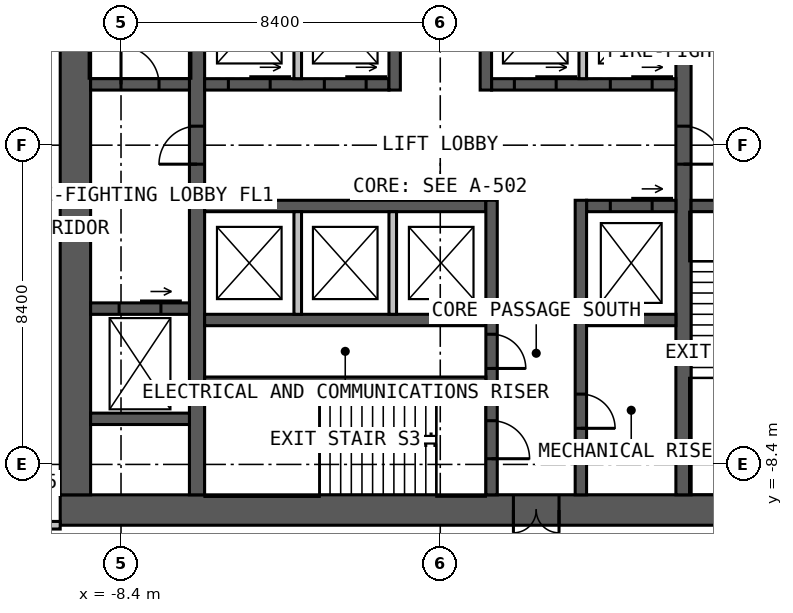
"""IFC4 building model, lengths in metres.
Left out: names, types, materials, properties, quantities, classifications, styles, units other than length and angle.
Written with IfcOpenShell. Run it as: python <this file> out.ifc"""

import sys

from ifc_helpers import new_model, si_unit, direction, frame, frame_2d, origin, place, context, subcontext, project, spatial, rectangle, extrude, element, fill, save


model = new_model("IFC4")
c1 = context("Model", 3, precision=1e-05, world=origin(), true_north=direction((0.0, 1.0)))
c2 = subcontext(c1, "Body", "Model", "MODEL_VIEW")
j1 = project(units=[si_unit("LENGTHUNIT", "METRE"), si_unit("PLANEANGLEUNIT", "RADIAN")], contexts=[c1])
p1 = place(None, origin())
s1 = spatial("IfcSite", under=j1, at=p1, CompositionType="ELEMENT")
p2 = place(p1, origin())
s2 = spatial("IfcBuilding", under=s1, at=p2, CompositionType="ELEMENT")
p3 = place(p2, frame((0.0, 0.0, 69.0)))
s3 = spatial("IfcBuildingStorey", under=s2, at=p3, CompositionType="ELEMENT", Elevation=69.0)
p4 = place(p3, frame((10.0, -9.6, 0.0), z_axis=(0.0, 0.0, 1.0), x_axis=(-1.0, 0.0, 0.0)))
e1 = element("IfcWall", 1, at=p4, inside=s3, PredefinedType="SOLIDWALL", context=c2, shape_type="SweptSolid", body=[
    extrude(rectangle(XDim=20.0, YDim=0.8, at=frame_2d((10.0, 0.0))), origin(), (0.0, 0.0, 1.0), 4.0),
])
p5 = place(p4, frame((6.875, 0.0, 0.0)))
e2 = element("IfcOpeningElement", 2, at=p5, cuts=e1, PredefinedType="OPENING", context=c2, shape_type="SweptSolid", body=[
    extrude(rectangle(XDim=1.2, YDim=2.2, at=frame_2d((0.6, 1.1))), frame((0.0, 0.41, 0.0), z_axis=(0.0, -1.0, 0.0), x_axis=(1.0, 0.0, 0.0)), (0.0, 0.0, 1.0), 0.82),
])
p6 = place(p3, frame((-9.6, 9.2, 0.0), z_axis=(0.0, 0.0, 1.0), x_axis=(0.0, -1.0, 0.0)))
e3 = element("IfcWall", 3, at=p6, inside=s3, PredefinedType="SOLIDWALL", context=c2, shape_type="SweptSolid", body=[
    extrude(rectangle(XDim=18.4, YDim=0.8, at=frame_2d((9.2, 0.0))), origin(), (0.0, 0.0, 1.0), 4.0),
])
p7 = place(p3, frame((-6.4, -9.2, 0.0), z_axis=(0.0, 0.0, 1.0), x_axis=(0.0, 1.0, 0.0)))
e4 = element("IfcWall", 4, at=p7, inside=s3, PredefinedType="SOLIDWALL", context=c2, shape_type="SweptSolid", body=[
    extrude(rectangle(XDim=18.4, YDim=0.4, at=frame_2d((9.2, 0.0))), origin(), (0.0, 0.0, 1.0), 4.0),
])
p8 = place(p7, frame((8.7, 0.0, 0.0)))
e5 = element("IfcOpeningElement", 5, at=p8, cuts=e4, PredefinedType="OPENING", context=c2, shape_type="SweptSolid", body=[
    extrude(rectangle(XDim=1.0, YDim=2.2, at=frame_2d((0.5, 1.1))), frame((0.0, 0.21, 0.0), z_axis=(0.0, -1.0, 0.0), x_axis=(1.0, 0.0, 0.0)), (0.0, 0.0, 1.0), 0.42),
])
p9 = place(p3, frame((6.4, 9.2, 0.0), z_axis=(0.0, 0.0, 1.0), x_axis=(0.0, -1.0, 0.0)))
e6 = element("IfcWall", 6, at=p9, inside=s3, PredefinedType="SOLIDWALL", context=c2, shape_type="SweptSolid", body=[
    extrude(rectangle(XDim=18.4, YDim=0.4, at=frame_2d((9.2, 0.0))), origin(), (0.0, 0.0, 1.0), 4.0),
])
p10 = place(p9, frame((8.7, 0.0, 0.0)))
e7 = element("IfcOpeningElement", 7, at=p10, cuts=e6, PredefinedType="OPENING", context=c2, shape_type="SweptSolid", body=[
    extrude(rectangle(XDim=1.0, YDim=2.2, at=frame_2d((0.5, 1.1))), frame((0.0, 0.21, 0.0), z_axis=(0.0, -1.0, 0.0), x_axis=(1.0, 0.0, 0.0)), (0.0, 0.0, 1.0), 0.42),
])
p11 = place(p3, frame((-6.2, 1.6, 0.0), z_axis=(0.0, 0.0, 1.0), x_axis=(1.0, 0.0, 0.0)))
e8 = element("IfcWall", 8, at=p11, inside=s3, PredefinedType="SOLIDWALL", context=c2, shape_type="SweptSolid", body=[
    extrude(rectangle(XDim=4.85, YDim=0.3, at=frame_2d((2.425, 0.0))), origin(), (0.0, 0.0, 1.0), 4.0),
])
p12 = place(p11, frame((0.625, 0.0, 0.0)))
e9 = element("IfcOpeningElement", 9, at=p12, cuts=e8, PredefinedType="OPENING", context=c2, shape_type="SweptSolid", body=[
    extrude(rectangle(XDim=1.1, YDim=2.2, at=frame_2d((0.55, 1.1))), frame((0.0, 0.16, 0.0), z_axis=(0.0, -1.0, 0.0), x_axis=(1.0, 0.0, 0.0)), (0.0, 0.0, 1.0), 0.32),
])
p13 = place(p11, frame((3.15, 0.0, 0.0)))
e10 = element("IfcOpeningElement", 10, at=p13, cuts=e8, PredefinedType="OPENING", context=c2, shape_type="SweptSolid", body=[
    extrude(rectangle(XDim=1.1, YDim=2.2, at=frame_2d((0.55, 1.1))), frame((0.0, 0.16, 0.0), z_axis=(0.0, -1.0, 0.0), x_axis=(1.0, 0.0, 0.0)), (0.0, 0.0, 1.0), 0.32),
])
p14 = place(p3, frame((1.35, 1.6, 0.0), z_axis=(0.0, 0.0, 1.0), x_axis=(1.0, 0.0, 0.0)))
e11 = element("IfcWall", 11, at=p14, inside=s3, PredefinedType="SOLIDWALL", context=c2, shape_type="SweptSolid", body=[
    extrude(rectangle(XDim=4.85, YDim=0.3, at=frame_2d((2.425, 0.0))), origin(), (0.0, 0.0, 1.0), 4.0),
])
p15 = place(p14, frame((0.6, 0.0, 0.0)))
e12 = element("IfcOpeningElement", 12, at=p15, cuts=e11, PredefinedType="OPENING", context=c2, shape_type="SweptSolid", body=[
    extrude(rectangle(XDim=1.1, YDim=2.2, at=frame_2d((0.55, 1.1))), frame((0.0, 0.16, 0.0), z_axis=(0.0, -1.0, 0.0), x_axis=(1.0, 0.0, 0.0)), (0.0, 0.0, 1.0), 0.32),
])
p16 = place(p14, frame((3.125, 0.0, 0.0)))
e13 = element("IfcOpeningElement", 13, at=p16, cuts=e11, PredefinedType="OPENING", context=c2, shape_type="SweptSolid", body=[
    extrude(rectangle(XDim=1.1, YDim=2.2, at=frame_2d((0.55, 1.1))), frame((0.0, 0.16, 0.0), z_axis=(0.0, -1.0, 0.0), x_axis=(1.0, 0.0, 0.0)), (0.0, 0.0, 1.0), 0.32),
])
p17 = place(p3, frame((-1.2, 1.45, 0.0), z_axis=(0.0, 0.0, 1.0), x_axis=(0.0, 1.0, 0.0)))
e14 = element("IfcWall", 14, at=p17, inside=s3, PredefinedType="SOLIDWALL", context=c2, shape_type="SweptSolid", body=[
    extrude(rectangle(XDim=7.75, YDim=0.3, at=frame_2d((3.875, 0.0))), origin(), (0.0, 0.0, 1.0), 4.0),
])
p18 = place(p17, frame((5.05, 0.0, 0.0)))
e15 = element("IfcOpeningElement", 15, at=p18, cuts=e14, PredefinedType="OPENING", context=c2, shape_type="SweptSolid", body=[
    extrude(rectangle(XDim=1.0, YDim=2.2, at=frame_2d((0.5, 1.1))), frame((0.0, 0.16, 0.0), z_axis=(0.0, -1.0, 0.0), x_axis=(1.0, 0.0, 0.0)), (0.0, 0.0, 1.0), 0.32),
])
p19 = place(p3, frame((1.2, 1.45, 0.0), z_axis=(0.0, 0.0, 1.0), x_axis=(0.0, 1.0, 0.0)))
e16 = element("IfcWall", 16, at=p19, inside=s3, PredefinedType="SOLIDWALL", context=c2, shape_type="SweptSolid", body=[
    extrude(rectangle(XDim=7.75, YDim=0.3, at=frame_2d((3.875, 0.0))), origin(), (0.0, 0.0, 1.0), 4.0),
])
p20 = place(p19, frame((3.8, 0.0, 0.0)))
e17 = element("IfcOpeningElement", 17, at=p20, cuts=e16, PredefinedType="OPENING", context=c2, shape_type="SweptSolid", body=[
    extrude(rectangle(XDim=1.0, YDim=2.2, at=frame_2d((0.5, 1.1))), frame((0.0, 0.16, 0.0), z_axis=(0.0, -1.0, 0.0), x_axis=(1.0, 0.0, 0.0)), (0.0, 0.0, 1.0), 0.32),
])
p21 = place(p19, frame((6.15, 0.0, 0.0)))
e18 = element("IfcOpeningElement", 18, at=p21, cuts=e16, PredefinedType="OPENING", context=c2, shape_type="SweptSolid", body=[
    extrude(rectangle(XDim=1.0, YDim=2.2, at=frame_2d((0.5, 1.1))), frame((0.0, 0.16, 0.0), z_axis=(0.0, -1.0, 0.0), x_axis=(1.0, 0.0, 0.0)), (0.0, 0.0, 1.0), 0.32),
])
p22 = place(p3, frame((-6.2, -1.6, 0.0), z_axis=(0.0, 0.0, 1.0), x_axis=(1.0, 0.0, 0.0)))
e19 = element("IfcWall", 19, at=p22, inside=s3, PredefinedType="SOLIDWALL", context=c2, shape_type="SweptSolid", body=[
    extrude(rectangle(XDim=7.4, YDim=0.3, at=frame_2d((3.7, 0.0))), origin(), (0.0, 0.0, 1.0), 4.0),
])
p23 = place(p3, frame((3.85, -1.6, 0.0), z_axis=(0.0, 0.0, 1.0), x_axis=(1.0, 0.0, 0.0)))
e20 = element("IfcWall", 20, at=p23, inside=s3, PredefinedType="SOLIDWALL", context=c2, shape_type="SweptSolid", body=[
    extrude(rectangle(XDim=2.35, YDim=0.3, at=frame_2d((1.175, 0.0))), origin(), (0.0, 0.0, 1.0), 4.0),
])
p24 = place(p23, frame((0.625, 0.0, 0.0)))
e21 = element("IfcOpeningElement", 21, at=p24, cuts=e20, PredefinedType="OPENING", context=c2, shape_type="SweptSolid", body=[
    extrude(rectangle(XDim=1.1, YDim=2.2, at=frame_2d((0.55, 1.1))), frame((0.0, 0.16, 0.0), z_axis=(0.0, -1.0, 0.0), x_axis=(1.0, 0.0, 0.0)), (0.0, 0.0, 1.0), 0.32),
])
p25 = place(p3, frame((-6.2, -4.6, 0.0), z_axis=(0.0, 0.0, 1.0), x_axis=(1.0, 0.0, 0.0)))
e22 = element("IfcWall", 22, at=p25, inside=s3, PredefinedType="SOLIDWALL", context=c2, shape_type="SweptSolid", body=[
    extrude(rectangle(XDim=7.4, YDim=0.3, at=frame_2d((3.7, 0.0))), origin(), (0.0, 0.0, 1.0), 4.0),
])
p26 = place(p3, frame((3.85, -4.6, 0.0), z_axis=(0.0, 0.0, 1.0), x_axis=(1.0, 0.0, 0.0)))
e23 = element("IfcWall", 23, at=p26, inside=s3, PredefinedType="SOLIDWALL", context=c2, shape_type="SweptSolid", body=[
    extrude(rectangle(XDim=2.35, YDim=0.3, at=frame_2d((1.175, 0.0))), origin(), (0.0, 0.0, 1.0), 4.0),
])
p27 = place(p3, frame((1.35, -1.45, 0.0), z_axis=(0.0, 0.0, 1.0), x_axis=(0.0, -1.0, 0.0)))
e24 = element("IfcWall", 24, at=p27, inside=s3, PredefinedType="SOLIDWALL", context=c2, shape_type="SweptSolid", body=[
    extrude(rectangle(XDim=7.75, YDim=0.3, at=frame_2d((3.875, 0.0))), origin(), (0.0, 0.0, 1.0), 4.0),
])
p28 = place(p27, frame((5.8, 0.0, 0.0)))
e25 = element("IfcOpeningElement", 25, at=p28, cuts=e24, PredefinedType="OPENING", context=c2, shape_type="SweptSolid", body=[
    extrude(rectangle(XDim=1.0, YDim=2.2, at=frame_2d((0.5, 1.1))), frame((0.0, 0.16, 0.0), z_axis=(0.0, -1.0, 0.0), x_axis=(1.0, 0.0, 0.0)), (0.0, 0.0, 1.0), 0.32),
])
p29 = place(p27, frame((3.525, 0.0, 0.0)))
e26 = element("IfcOpeningElement", 26, at=p29, cuts=e24, PredefinedType="OPENING", context=c2, shape_type="SweptSolid", body=[
    extrude(rectangle(XDim=0.9, YDim=2.2, at=frame_2d((0.45, 1.1))), frame((0.0, 0.16, 0.0), z_axis=(0.0, -1.0, 0.0), x_axis=(1.0, 0.0, 0.0)), (0.0, 0.0, 1.0), 0.32),
])
p30 = place(p3, frame((3.7, -1.45, 0.0), z_axis=(0.0, 0.0, 1.0), x_axis=(0.0, -1.0, 0.0)))
e27 = element("IfcWall", 27, at=p30, inside=s3, PredefinedType="SOLIDWALL", context=c2, shape_type="SweptSolid", body=[
    extrude(rectangle(XDim=7.75, YDim=0.3, at=frame_2d((3.875, 0.0))), origin(), (0.0, 0.0, 1.0), 4.0),
])
p31 = place(p30, frame((5.1, 0.0, 0.0)))
e28 = element("IfcOpeningElement", 28, at=p31, cuts=e27, PredefinedType="OPENING", context=c2, shape_type="SweptSolid", body=[
    extrude(rectangle(XDim=0.9, YDim=2.2, at=frame_2d((0.45, 1.1))), frame((0.0, 0.16, 0.0), z_axis=(0.0, -1.0, 0.0), x_axis=(1.0, 0.0, 0.0)), (0.0, 0.0, 1.0), 0.32),
])
p32 = place(p3, frame((-6.2, -6.2, 0.0), z_axis=(0.0, 0.0, 1.0), x_axis=(1.0, 0.0, 0.0)))
e29 = element("IfcWall", 29, at=p32, inside=s3, PredefinedType="SOLIDWALL", context=c2, shape_type="SweptSolid", body=[
    extrude(rectangle(XDim=7.4, YDim=0.2, at=frame_2d((3.7, 0.0))), origin(), (0.0, 0.0, 1.0), 4.0),
])
p33 = place(p3, frame((-9.2, 1.6, 0.0), z_axis=(0.0, 0.0, 1.0), x_axis=(1.0, 0.0, 0.0)))
e30 = element("IfcWall", 30, at=p33, inside=s3, PredefinedType="SOLIDWALL", context=c2, shape_type="SweptSolid", body=[
    extrude(rectangle(XDim=2.6, YDim=0.3, at=frame_2d((1.3, 0.0))), origin(), (0.0, 0.0, 1.0), 4.0),
])
p34 = place(p33, frame((0.8, 0.0, 0.0)))
e31 = element("IfcOpeningElement", 31, at=p34, cuts=e30, PredefinedType="OPENING", context=c2, shape_type="SweptSolid", body=[
    extrude(rectangle(XDim=1.0, YDim=2.2, at=frame_2d((0.5, 1.1))), frame((0.0, 0.16, 0.0), z_axis=(0.0, -1.0, 0.0), x_axis=(1.0, 0.0, 0.0)), (0.0, 0.0, 1.0), 0.32),
])
p35 = place(p3, frame((6.6, -1.6, 0.0), z_axis=(0.0, 0.0, 1.0), x_axis=(1.0, 0.0, 0.0)))
e32 = element("IfcWall", 32, at=p35, inside=s3, PredefinedType="SOLIDWALL", context=c2, shape_type="SweptSolid", body=[
    extrude(rectangle(XDim=2.6, YDim=0.3, at=frame_2d((1.3, 0.0))), origin(), (0.0, 0.0, 1.0), 4.0),
])
p36 = place(p35, frame((0.8, 0.0, 0.0)))
e33 = element("IfcOpeningElement", 33, at=p36, cuts=e32, PredefinedType="OPENING", context=c2, shape_type="SweptSolid", body=[
    extrude(rectangle(XDim=1.0, YDim=2.2, at=frame_2d((0.5, 1.1))), frame((0.0, 0.16, 0.0), z_axis=(0.0, -1.0, 0.0), x_axis=(1.0, 0.0, 0.0)), (0.0, 0.0, 1.0), 0.32),
])
p37 = place(p3, frame((-9.2, -4.3, 0.0), z_axis=(0.0, 0.0, 1.0), x_axis=(1.0, 0.0, 0.0)))
e34 = element("IfcWall", 34, at=p37, inside=s3, PredefinedType="SOLIDWALL", context=c2, shape_type="SweptSolid", body=[
    extrude(rectangle(XDim=2.6, YDim=0.3, at=frame_2d((1.3, 0.0))), origin(), (0.0, 0.0, 1.0), 4.0),
])
p38 = place(p37, frame((0.75, 0.0, 0.0)))
e35 = element("IfcOpeningElement", 35, at=p38, cuts=e34, PredefinedType="OPENING", context=c2, shape_type="SweptSolid", body=[
    extrude(rectangle(XDim=1.1, YDim=2.2, at=frame_2d((0.55, 1.1))), frame((0.0, 0.16, 0.0), z_axis=(0.0, -1.0, 0.0), x_axis=(1.0, 0.0, 0.0)), (0.0, 0.0, 1.0), 0.32),
])
p39 = place(p3, frame((-9.2, -7.2, 0.0), z_axis=(0.0, 0.0, 1.0), x_axis=(1.0, 0.0, 0.0)))
e36 = element("IfcWall", 36, at=p39, inside=s3, PredefinedType="SOLIDWALL", context=c2, shape_type="SweptSolid", body=[
    extrude(rectangle(XDim=2.6, YDim=0.3, at=frame_2d((1.3, 0.0))), origin(), (0.0, 0.0, 1.0), 4.0),
])
for number, where, z_axis, x_axis in (
    (37, (-3.75, 1.75, 0.0), (0.0, 0.0, 1.0), (0.0, 1.0, 0.0)),
    (38, (3.75, 1.75, 0.0), (0.0, 0.0, 1.0), (0.0, 1.0, 0.0)),
    (39, (-3.75, -1.75, 0.0), (0.0, 0.0, 1.0), (0.0, -1.0, 0.0)),
    (40, (-1.25, -1.75, 0.0), (0.0, 0.0, 1.0), (0.0, -1.0, 0.0)),
):
    element("IfcWall", number, at=place(p3, frame(where, z_axis=z_axis, x_axis=x_axis)), inside=s3, PredefinedType="SOLIDWALL", context=c2, shape_type="SweptSolid", body=[
        extrude(rectangle(XDim=2.7, YDim=0.2, at=frame_2d((1.35, 0.0))), origin(), (0.0, 0.0, 1.0), 3.75),
    ])
p40 = place(p3, frame((-10.0, -10.0, 0.0), z_axis=(0.0, 0.0, 1.0), x_axis=(-1.0, 0.0, 0.0)))
e41 = element("IfcWall", 41, at=p40, inside=s3, PredefinedType="PARTITIONING", context=c2, shape_type="SweptSolid", body=[
    extrude(rectangle(XDim=2.0, YDim=0.2, at=frame_2d((1.0, 0.0))), origin(), (0.0, 0.0, 1.0), 3.8),
])
p41 = place(p40, frame((0.5, 0.0, 0.0)))
e42 = element("IfcOpeningElement", 42, at=p41, cuts=e41, PredefinedType="OPENING", context=c2, shape_type="SweptSolid", body=[
    extrude(rectangle(XDim=1.0, YDim=2.2, at=frame_2d((0.5, 1.1))), frame((0.0, 0.11, 0.0), z_axis=(0.0, -1.0, 0.0), x_axis=(1.0, 0.0, 0.0)), (0.0, 0.0, 1.0), 0.22),
])
p42 = place(p5, origin())
e43 = element("IfcDoor", 43, at=p42, inside=s3, OperationType="DOUBLE_DOOR_SINGLE_SWING", PredefinedType="DOOR", context=c2, shape_type="SweptSolid", body=[
    extrude(rectangle(XDim=1.2, YDim=2.2, at=frame_2d((0.6, 1.1))), frame((0.0, 0.025, 0.0), z_axis=(0.0, -1.0, 0.0), x_axis=(1.0, 0.0, 0.0)), (0.0, 0.0, 1.0), 0.05),
])
fill(e2, e43)
p43 = place(p8, origin())
e44 = element("IfcDoor", 44, at=p43, inside=s3, OperationType="SINGLE_SWING_LEFT", PredefinedType="DOOR", context=c2, shape_type="SweptSolid", body=[
    extrude(rectangle(XDim=1.0, YDim=2.2, at=frame_2d((0.5, 1.1))), frame((0.0, 0.025, 0.0), z_axis=(0.0, -1.0, 0.0), x_axis=(1.0, 0.0, 0.0)), (0.0, 0.0, 1.0), 0.05),
])
fill(e5, e44)
p44 = place(p10, origin())
e45 = element("IfcDoor", 45, at=p44, inside=s3, OperationType="SINGLE_SWING_RIGHT", PredefinedType="DOOR", context=c2, shape_type="SweptSolid", body=[
    extrude(rectangle(XDim=1.0, YDim=2.2, at=frame_2d((0.5, 1.1))), frame((0.0, 0.025, 0.0), z_axis=(0.0, -1.0, 0.0), x_axis=(1.0, 0.0, 0.0)), (0.0, 0.0, 1.0), 0.05),
])
fill(e7, e45)
p45 = place(p34, origin())
e46 = element("IfcDoor", 46, at=p45, inside=s3, OperationType="SINGLE_SWING_LEFT", PredefinedType="DOOR", context=c2, shape_type="SweptSolid", body=[
    extrude(rectangle(XDim=1.0, YDim=2.2, at=frame_2d((0.5, 1.1))), frame((0.0, 0.025, 0.0), z_axis=(0.0, -1.0, 0.0), x_axis=(1.0, 0.0, 0.0)), (0.0, 0.0, 1.0), 0.05),
])
fill(e31, e46)
p46 = place(p28, origin())
e47 = element("IfcDoor", 47, at=p46, inside=s3, OperationType="SINGLE_SWING_RIGHT", PredefinedType="DOOR", context=c2, shape_type="SweptSolid", body=[
    extrude(rectangle(XDim=1.0, YDim=2.2, at=frame_2d((0.5, 1.1))), frame((0.0, 0.025, 0.0), z_axis=(0.0, -1.0, 0.0), x_axis=(1.0, 0.0, 0.0)), (0.0, 0.0, 1.0), 0.05),
])
fill(e25, e47)
p47 = place(p29, origin())
e48 = element("IfcDoor", 48, at=p47, inside=s3, OperationType="SINGLE_SWING_RIGHT", PredefinedType="DOOR", context=c2, shape_type="SweptSolid", body=[
    extrude(rectangle(XDim=0.9, YDim=2.2, at=frame_2d((0.45, 1.1))), frame((0.0, 0.025, 0.0), z_axis=(0.0, -1.0, 0.0), x_axis=(1.0, 0.0, 0.0)), (0.0, 0.0, 1.0), 0.05),
])
fill(e26, e48)
p48 = place(p31, origin())
e49 = element("IfcDoor", 49, at=p48, inside=s3, OperationType="SINGLE_SWING_RIGHT", PredefinedType="DOOR", context=c2, shape_type="SweptSolid", body=[
    extrude(rectangle(XDim=0.9, YDim=2.2, at=frame_2d((0.45, 1.1))), frame((0.0, 0.025, 0.0), z_axis=(0.0, -1.0, 0.0), x_axis=(1.0, 0.0, 0.0)), (0.0, 0.0, 1.0), 0.05),
])
fill(e28, e49)
p49 = place(p12, origin())
e50 = element("IfcDoor", 50, at=p49, inside=s3, OperationType="SLIDING_TO_LEFT", PredefinedType="DOOR", context=c2, shape_type="SweptSolid", body=[
    extrude(rectangle(XDim=1.1, YDim=2.2, at=frame_2d((0.55, 1.1))), frame((0.0, 0.025, 0.0), z_axis=(0.0, -1.0, 0.0), x_axis=(1.0, 0.0, 0.0)), (0.0, 0.0, 1.0), 0.05),
])
fill(e9, e50)
p50 = place(p13, origin())
e51 = element("IfcDoor", 51, at=p50, inside=s3, OperationType="SLIDING_TO_LEFT", PredefinedType="DOOR", context=c2, shape_type="SweptSolid", body=[
    extrude(rectangle(XDim=1.1, YDim=2.2, at=frame_2d((0.55, 1.1))), frame((0.0, 0.025, 0.0), z_axis=(0.0, -1.0, 0.0), x_axis=(1.0, 0.0, 0.0)), (0.0, 0.0, 1.0), 0.05),
])
fill(e10, e51)
p51 = place(p15, origin())
e52 = element("IfcDoor", 52, at=p51, inside=s3, OperationType="SLIDING_TO_LEFT", PredefinedType="DOOR", context=c2, shape_type="SweptSolid", body=[
    extrude(rectangle(XDim=1.1, YDim=2.2, at=frame_2d((0.55, 1.1))), frame((0.0, 0.025, 0.0), z_axis=(0.0, -1.0, 0.0), x_axis=(1.0, 0.0, 0.0)), (0.0, 0.0, 1.0), 0.05),
])
fill(e12, e52)
p52 = place(p16, origin())
e53 = element("IfcDoor", 53, at=p52, inside=s3, OperationType="SLIDING_TO_LEFT", PredefinedType="DOOR", context=c2, shape_type="SweptSolid", body=[
    extrude(rectangle(XDim=1.1, YDim=2.2, at=frame_2d((0.55, 1.1))), frame((0.0, 0.025, 0.0), z_axis=(0.0, -1.0, 0.0), x_axis=(1.0, 0.0, 0.0)), (0.0, 0.0, 1.0), 0.05),
])
fill(e13, e53)
p53 = place(p24, origin())
e54 = element("IfcDoor", 54, at=p53, inside=s3, OperationType="SLIDING_TO_LEFT", PredefinedType="DOOR", context=c2, shape_type="SweptSolid", body=[
    extrude(rectangle(XDim=1.1, YDim=2.2, at=frame_2d((0.55, 1.1))), frame((0.0, 0.025, 0.0), z_axis=(0.0, -1.0, 0.0), x_axis=(1.0, 0.0, 0.0)), (0.0, 0.0, 1.0), 0.05),
])
fill(e21, e54)
p54 = place(p38, origin())
e55 = element("IfcDoor", 55, at=p54, inside=s3, OperationType="SLIDING_TO_LEFT", PredefinedType="DOOR", context=c2, shape_type="SweptSolid", body=[
    extrude(rectangle(XDim=1.1, YDim=2.2, at=frame_2d((0.55, 1.1))), frame((0.0, 0.025, 0.0), z_axis=(0.0, -1.0, 0.0), x_axis=(1.0, 0.0, 0.0)), (0.0, 0.0, 1.0), 0.05),
])
fill(e35, e55)
save(model, sys.argv[1])
